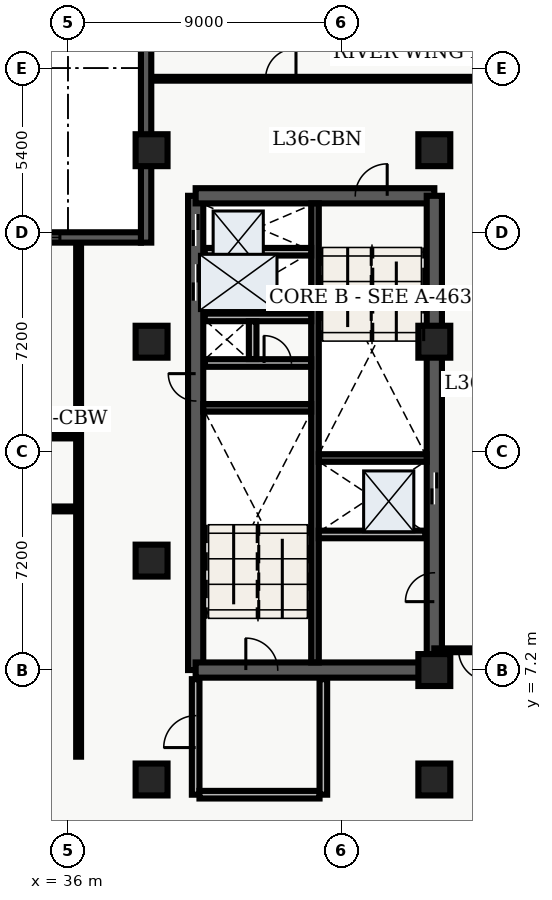
"""IFC4 building model, lengths in metres.
Left out: names, types, materials, properties, quantities, classifications, styles, units other than length and angle.
Written with IfcOpenShell. Run it as: python <this file> out.ifc"""

import sys

from ifc_helpers import new_model, entity, si_unit, converted_unit, direction, frame, origin_with_axes, origin_2d_with_axis, place, context, subcontext, project, spatial, polyline, rectangle, outline, extrude, element, fill, save


model = new_model("IFC4")
c1 = context("Model", 3, precision=1e-05, world=origin_with_axes(), true_north=direction((0.0, 1.0)))
c2 = subcontext(c1, "Body", "Model", "MODEL_VIEW")
j1 = project(units=[si_unit("LENGTHUNIT", "METRE"), converted_unit("PLANEANGLEUNIT", "DEGREE", entity("IfcPlaneAngleMeasure", 0.017), si_unit("PLANEANGLEUNIT", "RADIAN"), dimensions=[0, 0, 0, 0, 0, 0, 0])], contexts=[c1])
p1 = place(None, origin_with_axes())
s1 = spatial("IfcSite", under=j1, at=p1, CompositionType="ELEMENT")
p2 = place(p1, origin_with_axes())
s2 = spatial("IfcBuilding", under=s1, at=p2, CompositionType="ELEMENT")
p3 = place(p2, frame((0.0, 0.0, 148.5), z_axis=(0.0, 0.0, 1.0), x_axis=(1.0, 0.0, 0.0)))
s3 = spatial("IfcBuildingStorey", under=s2, at=p3, CompositionType="ELEMENT", Elevation=148.5)
p4 = place(p3, frame((40.2, 7.2, 0.0), z_axis=(0.0, 0.0, 1.0), x_axis=(0.0, 1.0, 0.0)))
e1 = element("IfcWall", 1, at=p4, inside=s3, PredefinedType="SHEAR", context=c2, shape_type="SweptSolid", body=[
    extrude(outline(polyline([(0.0, -0.25), (15.6, -0.25), (15.6, 0.25), (0.0, 0.25), (0.0, -0.25)])), origin_with_axes(), (0.0, 0.0, 1.0), 3.66),
])
p5 = place(p4, frame((14.475, 0.0, 0.0), z_axis=(0.0, 0.0, 1.0), x_axis=(1.0, 0.0, 0.0)))
e2 = element("IfcOpeningElement", 2, at=p5, cuts=e1, PredefinedType="OPENING", context=c2, shape_type="SweptSolid", body=[
    extrude(rectangle(XDim=1.05, YDim=0.52, at=origin_2d_with_axis()), origin_with_axes(), (0.0, 0.0, 1.0), 2.15),
])
p6 = place(p4, frame((12.75, 0.0, 0.0), z_axis=(0.0, 0.0, 1.0), x_axis=(1.0, 0.0, 0.0)))
e3 = element("IfcOpeningElement", 3, at=p6, cuts=e1, PredefinedType="OPENING", context=c2, shape_type="SweptSolid", body=[
    extrude(rectangle(XDim=1.2, YDim=0.52, at=origin_2d_with_axis()), origin_with_axes(), (0.0, 0.0, 1.0), 2.15),
])
p7 = place(p4, frame((9.3, 0.0, 0.0), z_axis=(0.0, 0.0, 1.0), x_axis=(1.0, 0.0, 0.0)))
e4 = element("IfcOpeningElement", 4, at=p7, cuts=e1, PredefinedType="OPENING", context=c2, shape_type="SweptSolid", body=[
    extrude(rectangle(XDim=0.9, YDim=0.52, at=origin_2d_with_axis()), origin_with_axes(), (0.0, 0.0, 1.0), 2.15),
])
p8 = place(p3, frame((40.2, 7.2, 0.0), z_axis=(0.0, 0.0, 1.0), x_axis=(1.0, 0.0, 0.0)))
e5 = element("IfcWall", 5, at=p8, inside=s3, PredefinedType="SHEAR", context=c2, shape_type="SweptSolid", body=[
    extrude(outline(polyline([(0.0, -0.25), (7.85, -0.25), (7.85, 0.25), (0.0, 0.25), (0.0, -0.25)])), origin_with_axes(), (0.0, 0.0, 1.0), 3.66),
])
p9 = place(p8, frame((2.175, 0.0, 0.0), z_axis=(0.0, 0.0, 1.0), x_axis=(1.0, 0.0, 0.0)))
e6 = element("IfcOpeningElement", 6, at=p9, cuts=e5, PredefinedType="OPENING", context=c2, shape_type="SweptSolid", body=[
    extrude(rectangle(XDim=1.05, YDim=0.52, at=origin_2d_with_axis()), origin_with_axes(), (0.0, 0.0, 1.0), 2.15),
])
p10 = place(p3, frame((40.2, 22.8, 0.0), z_axis=(0.0, 0.0, 1.0), x_axis=(1.0, 0.0, 0.0)))
e7 = element("IfcWall", 7, at=p10, inside=s3, PredefinedType="SHEAR", context=c2, shape_type="SweptSolid", body=[
    extrude(outline(polyline([(0.0, -0.25), (7.85, -0.25), (7.85, 0.25), (0.0, 0.25), (0.0, -0.25)])), origin_with_axes(), (0.0, 0.0, 1.0), 3.66),
])
p11 = place(p10, frame((5.775, 0.0, 0.0), z_axis=(0.0, 0.0, 1.0), x_axis=(1.0, 0.0, 0.0)))
e8 = element("IfcOpeningElement", 8, at=p11, cuts=e7, PredefinedType="OPENING", context=c2, shape_type="SweptSolid", body=[
    extrude(rectangle(XDim=1.05, YDim=0.52, at=origin_2d_with_axis()), origin_with_axes(), (0.0, 0.0, 1.0), 2.15),
])
p12 = place(p3, frame((48.05, 7.2, 0.0), z_axis=(0.0, 0.0, 1.0), x_axis=(0.0, 1.0, 0.0)))
e9 = element("IfcWall", 9, at=p12, inside=s3, PredefinedType="SHEAR", context=c2, shape_type="SweptSolid", body=[
    extrude(outline(polyline([(0.0, -0.25), (15.6, -0.25), (15.6, 0.25), (0.0, 0.25), (0.0, -0.25)])), origin_with_axes(), (0.0, 0.0, 1.0), 3.66),
])
p13 = place(p12, frame((5.975, 0.0, 0.0), z_axis=(0.0, 0.0, 1.0), x_axis=(1.0, 0.0, 0.0)))
e10 = element("IfcOpeningElement", 10, at=p13, cuts=e9, PredefinedType="OPENING", context=c2, shape_type="SweptSolid", body=[
    extrude(rectangle(XDim=1.05, YDim=0.52, at=origin_2d_with_axis()), origin_with_axes(), (0.0, 0.0, 1.0), 2.15),
])
p14 = place(p12, frame((2.725, 0.0, 0.0), z_axis=(0.0, 0.0, 1.0), x_axis=(1.0, 0.0, 0.0)))
e11 = element("IfcOpeningElement", 11, at=p14, cuts=e9, PredefinedType="OPENING", context=c2, shape_type="SweptSolid", body=[
    extrude(rectangle(XDim=0.95, YDim=0.52, at=origin_2d_with_axis()), origin_with_axes(), (0.0, 0.0, 1.0), 2.15),
])
p15 = place(p3, frame((44.125, 7.45, 0.0), z_axis=(0.0, 0.0, 1.0), x_axis=(0.0, 1.0, 0.0)))
e12 = element("IfcWall", 12, at=p15, inside=s3, PredefinedType="SHEAR", context=c2, shape_type="SweptSolid", body=[
    extrude(outline(polyline([(0.0, -0.125), (15.1, -0.125), (15.1, 0.125), (0.0, 0.125), (0.0, -0.125)])), origin_with_axes(), (0.0, 0.0, 1.0), 3.66),
])
for number, where, z_axis, x_axis in (
    (13, (40.45, 15.825, 0.0), (0.0, 0.0, 1.0), (1.0, 0.0, 0.0)),
    (14, (44.25, 14.175, 0.0), (0.0, 0.0, 1.0), (1.0, 0.0, 0.0)),
):
    element("IfcWall", number, at=place(p3, frame(where, z_axis=z_axis, x_axis=x_axis)), inside=s3, PredefinedType="SHEAR", context=c2, shape_type="SweptSolid", body=[
        extrude(outline(polyline([(0.0, -0.125), (3.55, -0.125), (3.55, 0.125), (0.0, 0.125), (0.0, -0.125)])), origin_with_axes(), (0.0, 0.0, 1.0), 3.66),
    ])
p16 = place(p3, frame((40.5, 17.3, 0.0), z_axis=(0.0, 0.0, 1.0), x_axis=(1.0, 0.0, 0.0)))
e15 = element("IfcWall", 15, at=p16, inside=s3, PredefinedType="SOLIDWALL", context=c2, shape_type="SweptSolid", body=[
    extrude(outline(polyline([(0.0, -0.125), (3.5, -0.125), (3.5, 0.125), (0.0, 0.125), (0.0, -0.125)])), origin_with_axes(), (0.0, 0.0, 1.0), 2.7),
])
p17 = place(p16, frame((2.4, 0.0, 0.0), z_axis=(0.0, 0.0, 1.0), x_axis=(1.0, 0.0, 0.0)))
e16 = element("IfcOpeningElement", 16, at=p17, cuts=e15, PredefinedType="OPENING", context=c2, shape_type="SweptSolid", body=[
    extrude(rectangle(XDim=0.9, YDim=0.27, at=origin_2d_with_axis()), origin_with_axes(), (0.0, 0.0, 1.0), 2.15),
])
p18 = place(p3, frame((40.5, 18.8, 0.0), z_axis=(0.0, 0.0, 1.0), x_axis=(1.0, 0.0, 0.0)))
e17 = element("IfcWall", 17, at=p18, inside=s3, PredefinedType="SOLIDWALL", context=c2, shape_type="SweptSolid", body=[
    extrude(outline(polyline([(0.0, -0.125), (3.5, -0.125), (3.5, 0.125), (0.0, 0.125), (0.0, -0.125)])), origin_with_axes(), (0.0, 0.0, 1.0), 2.7),
])
p19 = place(p3, frame((42.075, 17.43, 0.0), z_axis=(0.0, 0.0, 1.0), x_axis=(0.0, 1.0, 0.0)))
e18 = element("IfcWall", 18, at=p19, inside=s3, PredefinedType="SOLIDWALL", context=c2, shape_type="SweptSolid", body=[
    extrude(outline(polyline([(0.0, -0.125), (1.24, -0.125), (1.24, 0.125), (0.0, 0.125), (0.0, -0.125)])), origin_with_axes(), (0.0, 0.0, 1.0), 2.7),
])
p20 = place(p3, frame((40.2, 3.1, 0.0), z_axis=(0.0, 0.0, 1.0), x_axis=(0.0, 1.0, 0.0)))
e19 = element("IfcWall", 19, at=p20, inside=s3, PredefinedType="SOLIDWALL", context=c2, shape_type="SweptSolid", body=[
    extrude(outline(polyline([(0.0, -0.125), (3.8, -0.125), (3.8, 0.125), (0.0, 0.125), (0.0, -0.125)])), origin_with_axes(), (0.0, 0.0, 1.0), 2.7),
])
p21 = place(p20, frame((2.075, 0.0, 0.0), z_axis=(0.0, 0.0, 1.0), x_axis=(1.0, 0.0, 0.0)))
e20 = element("IfcOpeningElement", 20, at=p21, cuts=e19, PredefinedType="OPENING", context=c2, shape_type="SweptSolid", body=[
    extrude(rectangle(XDim=1.05, YDim=0.27, at=origin_2d_with_axis()), origin_with_axes(), (0.0, 0.0, 1.0), 2.15),
])
p22 = place(p3, frame((40.325, 3.1, 0.0), z_axis=(0.0, 0.0, 1.0), x_axis=(1.0, 0.0, 0.0)))
e21 = element("IfcWall", 21, at=p22, inside=s3, PredefinedType="SOLIDWALL", context=c2, shape_type="SweptSolid", body=[
    extrude(outline(polyline([(0.0, -0.125), (3.95, -0.125), (3.95, 0.125), (0.0, 0.125), (0.0, -0.125)])), origin_with_axes(), (0.0, 0.0, 1.0), 2.7),
])
p23 = place(p3, frame((44.4, 3.1, 0.0), z_axis=(0.0, 0.0, 1.0), x_axis=(0.0, 1.0, 0.0)))
e22 = element("IfcWall", 22, at=p23, inside=s3, PredefinedType="SOLIDWALL", context=c2, shape_type="SweptSolid", body=[
    extrude(outline(polyline([(0.0, -0.125), (3.8, -0.125), (3.8, 0.125), (0.0, 0.125), (0.0, -0.125)])), origin_with_axes(), (0.0, 0.0, 1.0), 2.7),
])
for number, where, z_axis, x_axis in (
    (23, (38.75, 3.6, 0.0), (0.0, 0.0, 1.0), (1.0, 0.0, 0.0)),
    (24, (38.75, 10.8, 0.0), (0.0, 0.0, 1.0), (1.0, 0.0, 0.0)),
    (25, (38.75, 18.0, 0.0), (0.0, 0.0, 1.0), (1.0, 0.0, 0.0)),
    (26, (38.75, 24.3, 0.0), (0.0, 0.0, 1.0), (1.0, 0.0, 0.0)),
    (27, (48.05, 3.6, 0.0), (0.0, 0.0, 1.0), (1.0, 0.0, 0.0)),
    (28, (48.05, 7.2, 0.0), (0.0, 0.0, 1.0), (1.0, 0.0, 0.0)),
    (29, (48.05, 18.0, 0.0), (0.0, 0.0, 1.0), (1.0, 0.0, 0.0)),
    (30, (48.05, 24.3, 0.0), (0.0, 0.0, 1.0), (1.0, 0.0, 0.0)),
):
    element("IfcColumn", number, at=place(p3, frame(where, z_axis=z_axis, x_axis=x_axis)), inside=s3, PredefinedType="COLUMN", context=c2, shape_type="SweptSolid", body=[
        extrude(rectangle(XDim=1.05, YDim=1.05, at=origin_2d_with_axis()), origin_with_axes(), (0.0, 0.0, 1.0), 3.9),
    ])
for number, where, z_axis, x_axis in (
    (31, (40.5, 20.96, 0.0), (0.0, 0.0, 1.0), (1.0, 0.0, 0.0)),
    (32, (44.25, 11.66, 0.0), (0.0, 0.0, 1.0), (1.0, 0.0, 0.0)),
):
    element("IfcWall", number, at=place(p3, frame(where, z_axis=z_axis, x_axis=x_axis)), inside=s3, PredefinedType="SOLIDWALL", context=c2, shape_type="SweptSolid", body=[
        extrude(outline(polyline([(0.0, -0.125), (3.5, -0.125), (3.5, 0.125), (0.0, 0.125), (0.0, -0.125)])), origin_with_axes(), (0.0, 0.0, 1.0), 2.7),
    ])
p24 = place(p3, frame((21.15, 12.5, 0.0), z_axis=(0.0, 0.0, 1.0), x_axis=(1.0, 0.0, 0.0)))
e33 = element("IfcWall", 33, at=p24, inside=s3, PredefinedType="PARTITIONING", context=c2, shape_type="SweptSolid", body=[
    extrude(outline(polyline([(0.0, -0.08), (15.2, -0.08), (15.2, 0.08), (0.0, 0.08), (0.0, -0.08)])), origin_with_axes(), (0.0, 0.0, 1.0), 2.7),
])
p25 = place(p24, frame((2.276, 0.0, 0.0), z_axis=(0.0, 0.0, 1.0), x_axis=(1.0, 0.0, 0.0)))
e34 = element("IfcOpeningElement", 34, at=p25, cuts=e33, PredefinedType="OPENING", context=c2, shape_type="SweptSolid", body=[
    extrude(rectangle(XDim=1.0, YDim=0.18, at=origin_2d_with_axis()), origin_with_axes(), (0.0, 0.0, 1.0), 2.15),
])
p26 = place(p24, frame((6.824, 0.0, 0.0), z_axis=(0.0, 0.0, 1.0), x_axis=(1.0, 0.0, 0.0)))
e35 = element("IfcOpeningElement", 35, at=p26, cuts=e33, PredefinedType="OPENING", context=c2, shape_type="SweptSolid", body=[
    extrude(rectangle(XDim=1.0, YDim=0.18, at=origin_2d_with_axis()), origin_with_axes(), (0.0, 0.0, 1.0), 2.15),
])
p27 = place(p24, frame((12.198, 0.0, 0.0), z_axis=(0.0, 0.0, 1.0), x_axis=(1.0, 0.0, 0.0)))
e36 = element("IfcOpeningElement", 36, at=p27, cuts=e33, PredefinedType="OPENING", context=c2, shape_type="SweptSolid", body=[
    extrude(rectangle(XDim=1.2, YDim=0.18, at=origin_2d_with_axis()), origin_with_axes(), (0.0, 0.0, 1.0), 2.2),
])
p28 = place(p3, frame((21.15, 14.9, 0.0), z_axis=(0.0, 0.0, 1.0), x_axis=(1.0, 0.0, 0.0)))
e37 = element("IfcWall", 37, at=p28, inside=s3, PredefinedType="PARTITIONING", context=c2, shape_type="SweptSolid", body=[
    extrude(outline(polyline([(0.0, -0.08), (15.2, -0.08), (15.2, 0.08), (0.0, 0.08), (0.0, -0.08)])), origin_with_axes(), (0.0, 0.0, 1.0), 2.7),
])
p29 = place(p28, frame((3.506, 0.0, 0.0), z_axis=(0.0, 0.0, 1.0), x_axis=(1.0, 0.0, 0.0)))
e38 = element("IfcOpeningElement", 38, at=p29, cuts=e37, PredefinedType="OPENING", context=c2, shape_type="SweptSolid", body=[
    extrude(rectangle(XDim=1.0, YDim=0.18, at=origin_2d_with_axis()), origin_with_axes(), (0.0, 0.0, 1.0), 2.15),
])
p30 = place(p28, frame((10.976, 0.0, 0.0), z_axis=(0.0, 0.0, 1.0), x_axis=(1.0, 0.0, 0.0)))
e39 = element("IfcOpeningElement", 39, at=p30, cuts=e37, PredefinedType="OPENING", context=c2, shape_type="SweptSolid", body=[
    extrude(rectangle(XDim=1.0, YDim=0.18, at=origin_2d_with_axis()), origin_with_axes(), (0.0, 0.0, 1.0), 2.15),
])
p31 = place(p3, frame((36.35, 4.35, 0.0), z_axis=(0.0, 0.0, 1.0), x_axis=(0.0, 1.0, 0.0)))
e40 = element("IfcWall", 40, at=p31, inside=s3, PredefinedType="PARTITIONING", context=c2, shape_type="SweptSolid", body=[
    extrude(outline(polyline([(0.0, -0.08), (16.95, -0.08), (16.95, 0.08), (0.0, 0.08), (0.0, -0.08)])), origin_with_axes(), (0.0, 0.0, 1.0), 2.7),
])
p32 = place(p3, frame((59.665, 7.85, 0.0), z_axis=(0.0, 0.0, 1.0), x_axis=(-1.0, 0.0, 0.0)))
e41 = element("IfcWall", 41, at=p32, inside=s3, PredefinedType="PARTITIONING", context=c2, shape_type="SweptSolid", body=[
    extrude(outline(polyline([(0.0, -0.062), (11.615, -0.062), (11.615, 0.062), (0.0, 0.062), (0.0, -0.062)])), origin_with_axes(), (0.0, 0.0, 1.0), 2.7),
])
p33 = place(p32, frame((10.315, 0.0, 0.0), z_axis=(0.0, 0.0, 1.0), x_axis=(1.0, 0.0, 0.0)))
e42 = element("IfcOpeningElement", 42, at=p33, cuts=e41, PredefinedType="OPENING", context=c2, shape_type="SweptSolid", body=[
    extrude(rectangle(XDim=1.0, YDim=0.145, at=origin_2d_with_axis()), origin_with_axes(), (0.0, 0.0, 1.0), 2.15),
])
p34 = place(p3, frame((38.735, 26.65, 0.0), z_axis=(0.0, 0.0, 1.0), x_axis=(1.0, 0.0, 0.0)))
e43 = element("IfcWall", 43, at=p34, inside=s3, PredefinedType="PARTITIONING", context=c2, shape_type="SweptSolid", body=[
    extrude(outline(polyline([(0.0, -0.062), (20.905, -0.062), (20.905, 0.062), (0.0, 0.062), (0.0, -0.062)])), origin_with_axes(), (0.0, 0.0, 1.0), 2.7),
])
p35 = place(p34, frame((4.265, 0.0, 0.0), z_axis=(0.0, 0.0, 1.0), x_axis=(1.0, 0.0, 0.0)))
e44 = element("IfcOpeningElement", 44, at=p35, cuts=e43, PredefinedType="OPENING", context=c2, shape_type="SweptSolid", body=[
    extrude(rectangle(XDim=1.0, YDim=0.145, at=origin_2d_with_axis()), origin_with_axes(), (0.0, 0.0, 1.0), 2.15),
])
p36 = place(p3, frame((38.57, 21.26, 0.0), z_axis=(0.0, 0.0, 1.0), x_axis=(0.0, 1.0, 0.0)))
e45 = element("IfcWall", 45, at=p36, inside=s3, PredefinedType="SOLIDWALL", context=c2, shape_type="SweptSolid", body=[
    extrude(outline(polyline([(0.0, -0.17), (7.54, -0.17), (7.54, 0.17), (0.0, 0.17), (0.0, -0.17)])), origin_with_axes(), (0.0, 0.0, 1.0), 3.66),
])
p37 = place(p3, frame((22.101, 21.43, 0.0), z_axis=(0.0, 0.0, 1.0), x_axis=(1.0, 0.0, 0.0)))
e46 = element("IfcWall", 46, at=p37, inside=s3, PredefinedType="SOLIDWALL", context=c2, shape_type="SweptSolid", body=[
    extrude(outline(polyline([(0.0, -0.17), (16.299, -0.17), (16.299, 0.17), (0.0, 0.17), (0.0, -0.17)])), origin_with_axes(), (0.0, 0.0, 1.0), 3.66),
])
p38 = place(p37, frame((3.117, 0.0, 0.45), z_axis=(0.0, 0.0, 1.0), x_axis=(1.0, 0.0, 0.0)))
e47 = element("IfcOpeningElement", 47, at=p38, cuts=e46, PredefinedType="OPENING", context=c2, shape_type="SweptSolid", body=[
    extrude(rectangle(XDim=1.8, YDim=0.36, at=origin_2d_with_axis()), origin_with_axes(), (0.0, 0.0, 1.0), 2.1),
])
p39 = place(p37, frame((8.149, 0.0, 0.45), z_axis=(0.0, 0.0, 1.0), x_axis=(1.0, 0.0, 0.0)))
e48 = element("IfcOpeningElement", 48, at=p39, cuts=e46, PredefinedType="OPENING", context=c2, shape_type="SweptSolid", body=[
    extrude(rectangle(XDim=1.8, YDim=0.36, at=origin_2d_with_axis()), origin_with_axes(), (0.0, 0.0, 1.0), 2.1),
])
p40 = place(p37, frame((12.733, 0.0, 0.45), z_axis=(0.0, 0.0, 1.0), x_axis=(1.0, 0.0, 0.0)))
e49 = element("IfcOpeningElement", 49, at=p40, cuts=e46, PredefinedType="OPENING", context=c2, shape_type="SweptSolid", body=[
    extrude(rectangle(XDim=1.8, YDim=0.36, at=origin_2d_with_axis()), origin_with_axes(), (0.0, 0.0, 1.0), 2.1),
])
p41 = place(p12, frame((5.975, 0.0, 0.0), z_axis=(0.0, 0.0, 1.0), x_axis=(1.0, 0.0, 0.0)))
e50 = element("IfcDoor", 50, at=p41, inside=s3, OperationType="SLIDING_TO_LEFT", PredefinedType="DOOR", context=c2, shape_type="SweptSolid", body=[
    extrude(rectangle(XDim=1.05, YDim=0.09, at=origin_2d_with_axis()), origin_with_axes(), (0.0, 0.0, 1.0), 2.15),
])
fill(e10, e50)
p42 = place(p4, frame((14.475, 0.0, 0.0), z_axis=(0.0, 0.0, 1.0), x_axis=(1.0, 0.0, 0.0)))
e51 = element("IfcDoor", 51, at=p42, inside=s3, OperationType="SLIDING_TO_RIGHT", PredefinedType="DOOR", context=c2, shape_type="SweptSolid", body=[
    extrude(rectangle(XDim=1.05, YDim=0.09, at=origin_2d_with_axis()), origin_with_axes(), (0.0, 0.0, 1.0), 2.15),
])
fill(e2, e51)
p43 = place(p4, frame((12.75, 0.0, 0.0), z_axis=(0.0, 0.0, 1.0), x_axis=(1.0, 0.0, 0.0)))
e52 = element("IfcDoor", 52, at=p43, inside=s3, OperationType="DOUBLE_DOOR_SLIDING", PredefinedType="DOOR", context=c2, shape_type="SweptSolid", body=[
    extrude(rectangle(XDim=1.2, YDim=0.09, at=origin_2d_with_axis()), origin_with_axes(), (0.0, 0.0, 1.0), 2.15),
])
fill(e3, e52)
p44 = place(p4, frame((9.3, 0.0, 0.0), z_axis=(0.0, 0.0, 1.0), x_axis=(1.0, 0.0, 0.0)))
e53 = element("IfcDoor", 53, at=p44, inside=s3, OperationType="SINGLE_SWING_RIGHT", PredefinedType="DOOR", context=c2, shape_type="SweptSolid", body=[
    extrude(rectangle(XDim=0.9, YDim=0.09, at=origin_2d_with_axis()), origin_with_axes(), (0.0, 0.0, 1.0), 2.15),
])
fill(e4, e53)
p45 = place(p16, frame((2.4, 0.0, 0.0), z_axis=(0.0, 0.0, 1.0), x_axis=(1.0, 0.0, 0.0)))
e54 = element("IfcDoor", 54, at=p45, inside=s3, OperationType="SINGLE_SWING_LEFT", PredefinedType="DOOR", context=c2, shape_type="SweptSolid", body=[
    extrude(rectangle(XDim=0.9, YDim=0.09, at=origin_2d_with_axis()), origin_with_axes(), (0.0, 0.0, 1.0), 2.15),
])
fill(e16, e54)
p46 = place(p8, frame((2.175, 0.0, 0.0), z_axis=(0.0, 0.0, 1.0), x_axis=(1.0, 0.0, 0.0)))
e55 = element("IfcDoor", 55, at=p46, inside=s3, OperationType="SINGLE_SWING_LEFT", PredefinedType="DOOR", context=c2, shape_type="SweptSolid", body=[
    extrude(rectangle(XDim=1.05, YDim=0.09, at=origin_2d_with_axis()), origin_with_axes(), (0.0, 0.0, 1.0), 2.15),
])
fill(e6, e55)
p47 = place(p10, frame((5.775, 0.0, 0.0), z_axis=(0.0, 0.0, 1.0), x_axis=(1.0, 0.0, 0.0)))
e56 = element("IfcDoor", 56, at=p47, inside=s3, OperationType="SINGLE_SWING_RIGHT", PredefinedType="DOOR", context=c2, shape_type="SweptSolid", body=[
    extrude(rectangle(XDim=1.05, YDim=0.09, at=origin_2d_with_axis()), origin_with_axes(), (0.0, 0.0, 1.0), 2.15),
])
fill(e8, e56)
p48 = place(p20, frame((2.075, 0.0, 0.0), z_axis=(0.0, 0.0, 1.0), x_axis=(1.0, 0.0, 0.0)))
e57 = element("IfcDoor", 57, at=p48, inside=s3, OperationType="SINGLE_SWING_LEFT", PredefinedType="DOOR", context=c2, shape_type="SweptSolid", body=[
    extrude(rectangle(XDim=1.05, YDim=0.09, at=origin_2d_with_axis()), origin_with_axes(), (0.0, 0.0, 1.0), 2.15),
])
fill(e20, e57)
p49 = place(p12, frame((2.725, 0.0, 0.0), z_axis=(0.0, 0.0, 1.0), x_axis=(1.0, 0.0, 0.0)))
e58 = element("IfcDoor", 58, at=p49, inside=s3, OperationType="SINGLE_SWING_LEFT", PredefinedType="DOOR", context=c2, shape_type="SweptSolid", body=[
    extrude(rectangle(XDim=0.95, YDim=0.09, at=origin_2d_with_axis()), origin_with_axes(), (0.0, 0.0, 1.0), 2.15),
])
fill(e11, e58)
p50 = place(p32, frame((10.315, 0.0, 0.0), z_axis=(0.0, 0.0, 1.0), x_axis=(1.0, 0.0, 0.0)))
e59 = element("IfcDoor", 59, at=p50, inside=s3, OperationType="SINGLE_SWING_LEFT", PredefinedType="DOOR", context=c2, shape_type="SweptSolid", body=[
    extrude(rectangle(XDim=1.0, YDim=0.075, at=origin_2d_with_axis()), origin_with_axes(), (0.0, 0.0, 1.0), 2.15),
])
fill(e42, e59)
p51 = place(p34, frame((4.265, 0.0, 0.0), z_axis=(0.0, 0.0, 1.0), x_axis=(1.0, 0.0, 0.0)))
e60 = element("IfcDoor", 60, at=p51, inside=s3, OperationType="SINGLE_SWING_RIGHT", PredefinedType="DOOR", context=c2, shape_type="SweptSolid", body=[
    extrude(rectangle(XDim=1.0, YDim=0.075, at=origin_2d_with_axis()), origin_with_axes(), (0.0, 0.0, 1.0), 2.15),
])
fill(e44, e60)
p52 = place(p37, frame((12.733, 0.0, 0.45), z_axis=(0.0, 0.0, 1.0), x_axis=(1.0, 0.0, 0.0)))
e61 = element("IfcWindow", 61, at=p52, inside=s3, PredefinedType="WINDOW", context=c2, shape_type="SweptSolid", body=[
    extrude(rectangle(XDim=1.8, YDim=0.09, at=origin_2d_with_axis()), origin_with_axes(), (0.0, 0.0, 1.0), 2.1),
])
fill(e49, e61)
save(model, sys.argv[1])
